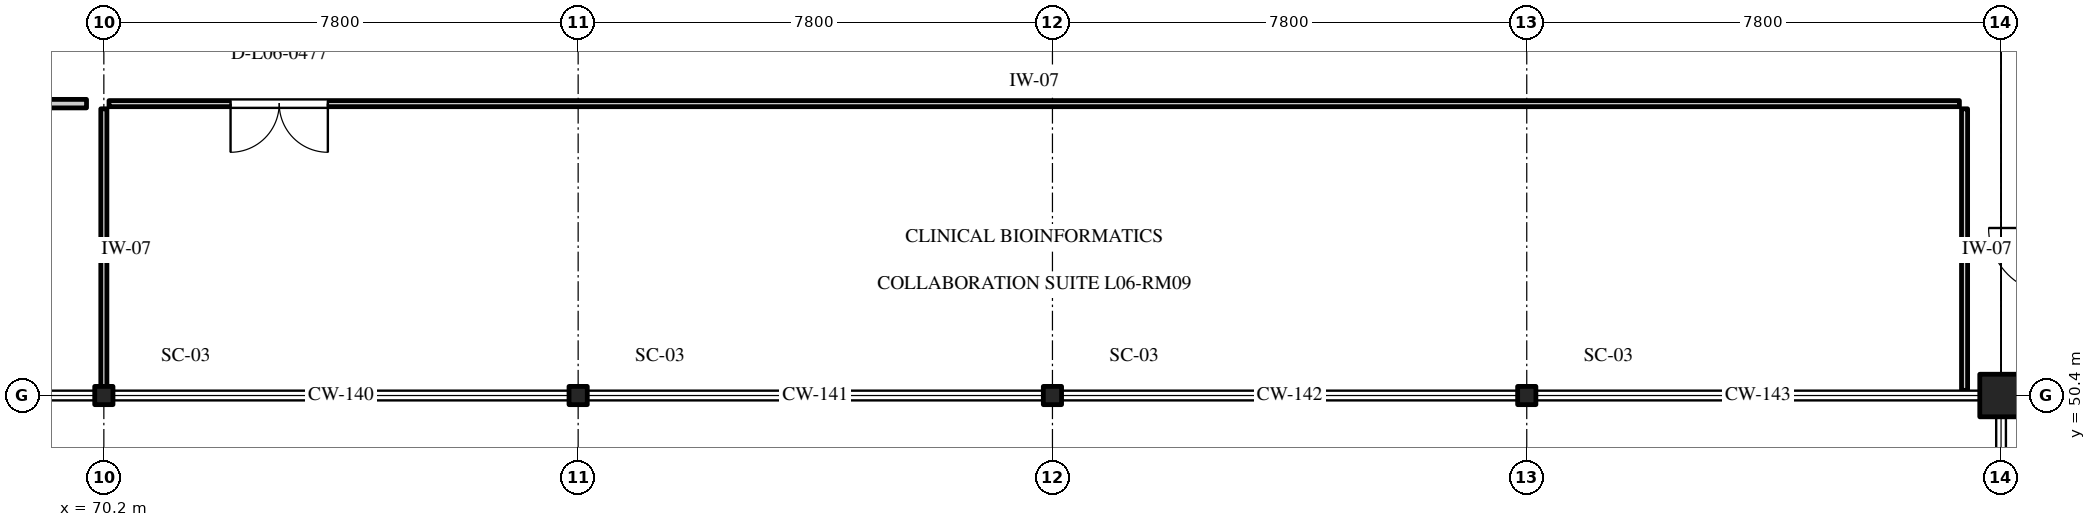
"""IFC4 building model, lengths in metres.
Left out: names, types, materials, properties, quantities, classifications, styles, units other than length and angle.
Written with IfcOpenShell. Run it as: python <this file> out.ifc"""

import sys

from ifc_helpers import new_model, si_unit, direction, frame, frame_2d, origin, origin_2d, place, context, subcontext, project, spatial, rectangle, i_section, extrude, element, fill, save


model = new_model("IFC4")
c1 = context("Model", 3, precision=1e-05, world=origin(), true_north=direction((0.0, 1.0)))
c2 = subcontext(c1, "Body", "Model", "MODEL_VIEW")
j1 = project(units=[si_unit("LENGTHUNIT", "METRE"), si_unit("PLANEANGLEUNIT", "RADIAN")], contexts=[c1])
p1 = place(None, origin())
s1 = spatial("IfcSite", under=j1, at=p1, CompositionType="ELEMENT")
p2 = place(p1, origin())
s2 = spatial("IfcBuilding", under=s1, at=p2, CompositionType="ELEMENT")
p3 = place(p2, frame((0.0, 0.0, 26.1)))
s3 = spatial("IfcBuildingStorey", under=s2, at=p3, CompositionType="ELEMENT", Elevation=26.1)
for number, where, z_axis, x_axis in (
    (1, (70.2, 50.4, 0.0), (0.0, 0.0, 1.0), (1.0, 0.0, 0.0)),
    (2, (78.0, 50.4, 0.0), (0.0, 0.0, 1.0), (1.0, 0.0, 0.0)),
    (3, (85.8, 50.4, 0.0), (0.0, 0.0, 1.0), (1.0, 0.0, 0.0)),
    (4, (93.6, 50.4, 0.0), (0.0, 0.0, 1.0), (1.0, 0.0, 0.0)),
):
    element("IfcColumn", number, at=place(p3, frame(where, z_axis=z_axis, x_axis=x_axis)), inside=s3, PredefinedType="COLUMN", context=c2, shape_type="SweptSolid", body=[
        extrude(i_section(OverallWidth=0.3, OverallDepth=0.3, WebThickness=0.011, FlangeThickness=0.019, FilletRadius=0.027, at=origin_2d()), origin(), (0.0, 0.0, 1.0), 3.6),
    ])
p4 = place(p3, frame((101.4, 50.4, 0.0), z_axis=(0.0, 0.0, 1.0), x_axis=(1.0, 0.0, 0.0)))
e5 = element("IfcColumn", 5, at=p4, inside=s3, PredefinedType="COLUMN", context=c2, shape_type="SweptSolid", body=[
    extrude(rectangle(XDim=0.7, YDim=0.7, at=origin_2d()), origin(), (0.0, 0.0, 1.0), 3.6),
])
p5 = place(p3, frame((70.285, 55.2, 0.0), z_axis=(0.0, 0.0, 1.0), x_axis=(1.0, 0.0, 0.0)))
e6 = element("IfcWall", 6, at=p5, inside=s3, PredefinedType="PARTITIONING", context=c2, shape_type="SweptSolid", body=[
    extrude(rectangle(XDim=30.43, YDim=0.1, at=frame_2d((15.215, 0.0))), origin(), (0.0, 0.0, 1.0), 3.28),
])
p6 = place(p5, frame((1.999, 0.0, 0.0)))
e7 = element("IfcOpeningElement", 7, at=p6, cuts=e6, PredefinedType="OPENING", context=c2, shape_type="SweptSolid", body=[
    extrude(rectangle(XDim=1.6, YDim=2.25, at=frame_2d((0.8, 1.125))), frame((0.0, 0.062, 0.0), z_axis=(0.0, -1.0, 0.0), x_axis=(1.0, 0.0, 0.0)), (0.0, 0.0, 1.0), 0.124),
])
p7 = place(p3, frame((70.2, 50.485, 0.0), z_axis=(0.0, 0.0, 1.0), x_axis=(0.0, 1.0, 0.0)))
e8 = element("IfcWall", 8, at=p7, inside=s3, PredefinedType="PARTITIONING", context=c2, shape_type="SweptSolid", body=[
    extrude(rectangle(XDim=4.63, YDim=0.1, at=frame_2d((2.315, 0.0))), origin(), (0.0, 0.0, 1.0), 2.65),
])
p8 = place(p3, frame((100.8, 50.485, 0.0), z_axis=(0.0, 0.0, 1.0), x_axis=(0.0, 1.0, 0.0)))
e9 = element("IfcWall", 9, at=p8, inside=s3, PredefinedType="PARTITIONING", context=c2, shape_type="SweptSolid", body=[
    extrude(rectangle(XDim=4.63, YDim=0.1, at=frame_2d((2.315, 0.0))), origin(), (0.0, 0.0, 1.0), 3.28),
])
p9 = place(p3, frame((54.885, 55.2, 0.0), z_axis=(0.0, 0.0, 1.0), x_axis=(1.0, 0.0, 0.0)))
e10 = element("IfcWall", 10, at=p9, inside=s3, PredefinedType="PARTITIONING", context=c2, shape_type="SweptSolid", body=[
    extrude(rectangle(XDim=15.03, YDim=0.14, at=frame_2d((7.515, 0.0))), origin(), (0.0, 0.0, 1.0), 3.28),
])
p10 = place(p9, frame((1.963, 0.0, 0.0)))
e11 = element("IfcOpeningElement", 11, at=p10, cuts=e10, PredefinedType="OPENING", context=c2, shape_type="SweptSolid", body=[
    extrude(rectangle(XDim=1.85, YDim=2.3, at=frame_2d((0.925, 1.15))), frame((0.0, 0.082, 0.0), z_axis=(0.0, -1.0, 0.0), x_axis=(1.0, 0.0, 0.0)), (0.0, 0.0, 1.0), 0.164),
])
p11 = place(p6, frame((1.6, 0.0, 0.0), z_axis=(0.0, 0.0, 1.0), x_axis=(-1.0, 0.0, 0.0)))
e12 = element("IfcDoor", 12, at=p11, inside=s3, OperationType="DOUBLE_DOOR_SINGLE_SWING", PredefinedType="DOOR", context=c2, shape_type="SweptSolid", body=[
    extrude(rectangle(XDim=1.6, YDim=2.25, at=frame_2d((0.8, 1.125))), frame((0.0, 0.025, 0.0), z_axis=(0.0, -1.0, 0.0), x_axis=(1.0, 0.0, 0.0)), (0.0, 0.0, 1.0), 0.05),
])
fill(e7, e12)
save(model, sys.argv[1])
